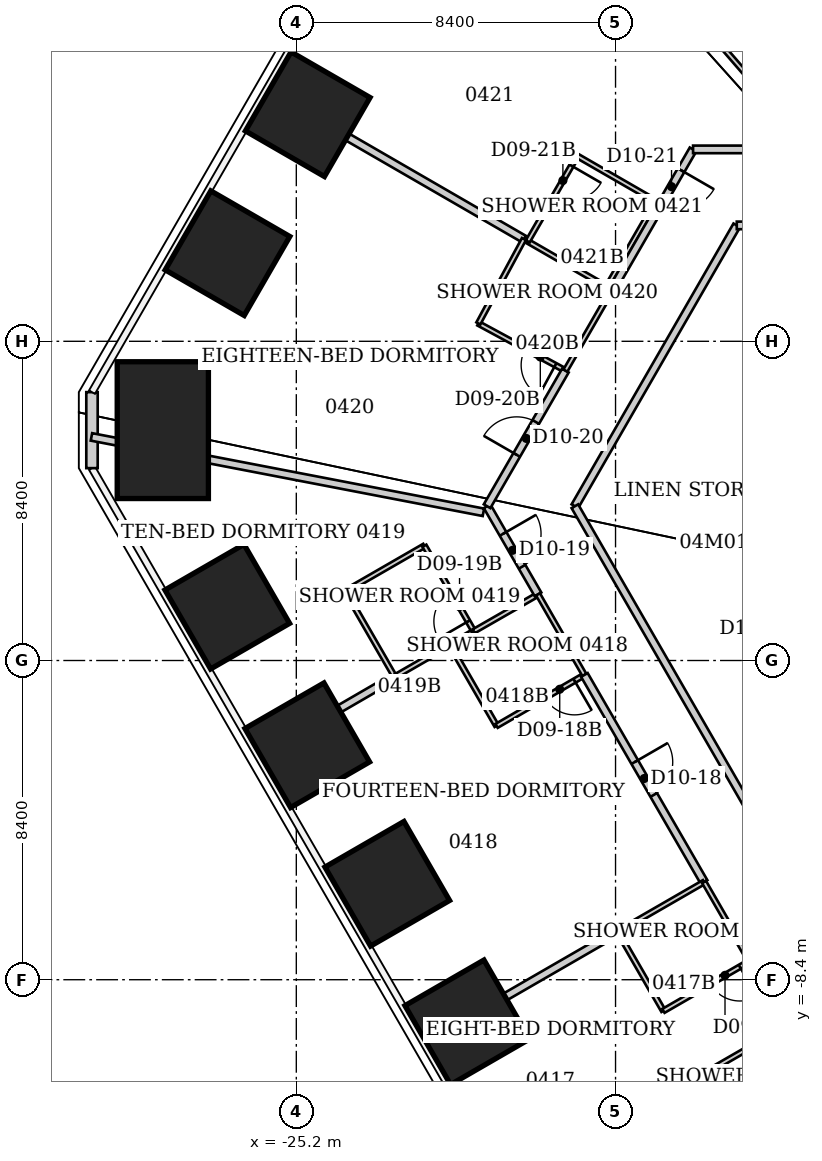
"""IFC4 building model, lengths in metres.
Left out: names, types, materials, properties, quantities, classifications, styles, units other than length and angle.
Written with IfcOpenShell. Run it as: python <this file> out.ifc"""

import sys

from ifc_helpers import new_model, si_unit, direction, frame, frame_2d, origin, origin_2d, place, context, subcontext, project, spatial, rectangle, extrude, element, fill, save


model = new_model("IFC4")
c1 = context("Model", 3, precision=1e-05, world=origin(), true_north=direction((0.0, 1.0)))
c2 = subcontext(c1, "Body", "Model", "MODEL_VIEW")
j1 = project(units=[si_unit("LENGTHUNIT", "METRE"), si_unit("PLANEANGLEUNIT", "RADIAN")], contexts=[c1])
p1 = place(None, origin())
s1 = spatial("IfcSite", under=j1, at=p1, CompositionType="ELEMENT")
p2 = place(p1, origin())
s2 = spatial("IfcBuilding", under=s1, at=p2, CompositionType="ELEMENT")
p3 = place(p2, frame((0.0, 0.0, 23.0)))
s3 = spatial("IfcBuildingStorey", under=s2, at=p3, CompositionType="ELEMENT", Elevation=23.0)
for number, where, z_axis, x_axis in (
    (1, (-20.701, -9.521, 0.0), (0.0, 0.0, 1.0), (-0.866, -0.5, 0.0)),
    (2, (-22.806, -5.875, 0.0), (0.0, 0.0, 1.0), (-0.866, -0.5, 0.0)),
    (3, (-24.911, -2.23, 0.0), (0.0, 0.0, 1.0), (-0.866, -0.5, 0.0)),
    (4, (-27.016, 1.416, 0.0), (0.0, 0.0, 1.0), (-0.866, -0.5, 0.0)),
):
    element("IfcColumn", number, at=place(p3, frame(where, z_axis=z_axis, x_axis=x_axis)), inside=s3, PredefinedType="COLUMN", context=c2, shape_type="SweptSolid", body=[
        extrude(rectangle(XDim=2.4, YDim=2.4, at=origin_2d()), origin(), (0.0, 0.0, 1.0), 3.8),
    ])
p4 = place(p3, frame((-28.713, 6.062, 0.0), z_axis=(0.0, 0.0, 1.0), x_axis=(-1.0, 0.0, 0.0)))
e5 = element("IfcColumn", 5, at=p4, inside=s3, PredefinedType="COLUMN", context=c2, shape_type="SweptSolid", body=[
    extrude(rectangle(XDim=2.4, YDim=3.6, at=origin_2d()), origin(), (0.0, 0.0, 1.0), 3.8),
])
for number, where, z_axis, x_axis in (
    (6, (-27.01, 10.719, 0.0), (0.0, 0.0, 1.0), (-0.866, 0.5, 0.0)),
    (7, (-24.899, 14.375, 0.0), (0.0, 0.0, 1.0), (-0.866, 0.5, 0.0)),
):
    element("IfcColumn", number, at=place(p3, frame(where, z_axis=z_axis, x_axis=x_axis)), inside=s3, PredefinedType="COLUMN", context=c2, shape_type="SweptSolid", body=[
        extrude(rectangle(XDim=2.4, YDim=2.4, at=origin_2d()), origin(), (0.0, 0.0, 1.0), 3.8),
    ])
p5 = place(p3, frame((-30.576, 5.062, 0.0), z_axis=(0.0, 0.0, 1.0), x_axis=(0.0, 1.0, 0.0)))
e8 = element("IfcWall", 8, at=p5, inside=s3, PredefinedType="SOLIDWALL", context=c2, shape_type="SweptSolid", body=[
    extrude(rectangle(XDim=2.0, YDim=0.3, at=frame_2d((1.0, 0.0))), origin(), (0.0, 0.0, 1.0), 3.64),
])
p6 = place(p3, frame((-30.591, 5.884, 0.0), z_axis=(0.0, 0.0, 1.0), x_axis=(0.981987542287, -0.188945671541, 0.0)))
e9 = element("IfcWall", 9, at=p6, inside=s3, PredefinedType="PARTITIONING", context=c2, shape_type="SweptSolid", body=[
    extrude(rectangle(XDim=10.504, YDim=0.2, at=frame_2d((5.252, 0.0))), origin(), (0.0, 0.0, 1.0), 3.64),
])
p7 = place(p3, frame((-26.096, -2.45, 0.0), z_axis=(0.0, 0.0, 1.0), x_axis=(0.864983223647, 0.501800780001, 0.0)))
e10 = element("IfcWall", 10, at=p7, inside=s3, PredefinedType="PARTITIONING", context=c2, shape_type="SweptSolid", body=[
    extrude(rectangle(XDim=4.065, YDim=0.2, at=frame_2d((2.032, 0.0))), origin(), (0.0, 0.0, 1.0), 3.64),
])
p8 = place(p3, frame((-25.886, 14.95, 0.0), z_axis=(0.0, 0.0, 1.0), x_axis=(0.865726686167, -0.50051703753, 0.0)))
e11 = element("IfcWall", 11, at=p8, inside=s3, PredefinedType="PARTITIONING", context=c2, shape_type="SweptSolid", body=[
    extrude(rectangle(XDim=7.712, YDim=0.2, at=frame_2d((3.856, 0.0))), origin(), (0.0, 0.0, 1.0), 2.86),
])
p9 = place(p3, frame((-23.91, 1.82, 0.0), z_axis=(0.0, 0.0, 1.0), x_axis=(0.50026500294, -0.865872350196, 0.0)))
e12 = element("IfcWall", 12, at=p9, inside=s3, PredefinedType="PARTITIONING", context=c2, shape_type="SweptSolid", body=[
    extrude(rectangle(XDim=2.583, YDim=0.12, at=frame_2d((1.292, 0.0))), origin(), (0.0, 0.0, 1.0), 3.64),
])
p10 = place(p3, frame((-22.58, -0.41, 0.0), z_axis=(0.0, 0.0, 1.0), x_axis=(0.866054188497, 0.499950140102, 0.0)))
e13 = element("IfcWall", 13, at=p10, inside=s3, PredefinedType="PARTITIONING", context=c2, shape_type="SweptSolid", body=[
    extrude(rectangle(XDim=1.64, YDim=0.12, at=frame_2d((0.82, 0.0))), origin(), (0.0, 0.0, 1.0), 3.64),
])
p11 = place(p3, frame((-21.83, 3.02, 0.0), z_axis=(0.0, 0.0, 1.0), x_axis=(-0.866177122335, -0.499737123639, 0.0)))
e14 = element("IfcWall", 14, at=p11, inside=s3, PredefinedType="PARTITIONING", context=c2, shape_type="SweptSolid", body=[
    extrude(rectangle(XDim=2.401, YDim=0.12, at=frame_2d((1.201, 0.0))), origin(), (0.0, 0.0, 1.0), 3.64),
])
p12 = place(p3, frame((-21.726, -10.02, 0.0), z_axis=(0.0, 0.0, 1.0), x_axis=(0.865919350456, 0.50018364478, 0.0)))
e15 = element("IfcWall", 15, at=p12, inside=s3, PredefinedType="PARTITIONING", context=c2, shape_type="SweptSolid", body=[
    extrude(rectangle(XDim=5.758, YDim=0.2, at=frame_2d((2.879, 0.0))), origin(), (0.0, 0.0, 1.0), 3.023),
])
p13 = place(p3, frame((-21.16, 0.41, 0.0), z_axis=(0.0, 0.0, 1.0), x_axis=(0.868139588385, 0.496320113515, 0.0)))
e16 = element("IfcWall", 16, at=p13, inside=s3, PredefinedType="PARTITIONING", context=c2, shape_type="SweptSolid", body=[
    extrude(rectangle(XDim=0.726, YDim=0.12, at=frame_2d((0.363, 0.0))), origin(), (0.0, 0.0, 1.0), 3.64),
])
p14 = place(p3, frame((-21.16, 0.41, 0.0), z_axis=(0.0, 0.0, 1.0), x_axis=(0.500089055364, -0.86597398154, 0.0)))
e17 = element("IfcWall", 17, at=p14, inside=s3, PredefinedType="PARTITIONING", context=c2, shape_type="SweptSolid", body=[
    extrude(rectangle(XDim=2.459, YDim=0.12, at=frame_2d((1.23, 0.0))), origin(), (0.0, 0.0, 1.0), 3.64),
])
p15 = place(p3, frame((-20.53, 0.77, 0.0), z_axis=(0.0, 0.0, 1.0), x_axis=(-0.500291685314, 0.865856933682, 0.0)))
e18 = element("IfcWall", 18, at=p15, inside=s3, PredefinedType="PARTITIONING", context=c2, shape_type="SweptSolid", body=[
    extrude(rectangle(XDim=2.599, YDim=0.12, at=frame_2d((1.299, 0.0))), origin(), (0.0, 0.0, 1.0), 3.64),
])
p16 = place(p15, frame((0.3, 0.0, 0.0)))
e19 = element("IfcOpeningElement", 19, at=p16, cuts=e18, PredefinedType="OPENING", context=c2, shape_type="SweptSolid", body=[
    extrude(rectangle(XDim=0.9, YDim=2.03, at=frame_2d((0.45, 1.015))), frame((0.0, 0.06, 0.0), z_axis=(0.0, -1.0, 0.0), x_axis=(1.0, 0.0, 0.0)), (0.0, 0.0, 1.0), 0.12),
])
p17 = place(p3, frame((-20.53, 0.77, 0.0), z_axis=(0.0, 0.0, 1.0), x_axis=(0.867293167797, 0.497797711016, 0.0)))
e20 = element("IfcWall", 20, at=p17, inside=s3, PredefinedType="PARTITIONING", context=c2, shape_type="SweptSolid", body=[
    extrude(rectangle(XDim=1.948, YDim=0.12, at=frame_2d((0.974, 0.0))), origin(), (0.0, 0.0, 1.0), 3.64),
])
p18 = place(p3, frame((-20.41, 8.87, 0.0), z_axis=(0.0, 0.0, 1.0), x_axis=(0.879324680711, -0.476222748189, 0.0)))
e21 = element("IfcWall", 21, at=p18, inside=s3, PredefinedType="PARTITIONING", context=c2, shape_type="SweptSolid", body=[
    extrude(rectangle(XDim=2.604, YDim=0.12, at=frame_2d((1.302, 0.0))), origin(), (0.0, 0.0, 1.0), 3.64),
])
p19 = place(p18, frame((1.404, 0.0, 0.0)))
e22 = element("IfcOpeningElement", 22, at=p19, cuts=e21, PredefinedType="OPENING", context=c2, shape_type="SweptSolid", body=[
    extrude(rectangle(XDim=0.9, YDim=2.03, at=frame_2d((0.45, 1.015))), frame((0.0, 0.06, 0.0), z_axis=(0.0, -1.0, 0.0), x_axis=(1.0, 0.0, 0.0)), (0.0, 0.0, 1.0), 0.12),
])
p20 = place(p3, frame((-20.18, 4.06, 0.0), z_axis=(0.0, 0.0, 1.0), x_axis=(0.500098439427, -0.865968562295, 0.0)))
e23 = element("IfcWall", 23, at=p20, inside=s3, PredefinedType="PARTITIONING", context=c2, shape_type="SweptSolid", body=[
    extrude(rectangle(XDim=2.679, YDim=0.2, at=frame_2d((1.34, 0.0))), origin(), (0.0, 0.0, 1.0), 3.64),
])
p21 = place(p20, frame((0.84, 0.0, 0.0)))
e24 = element("IfcOpeningElement", 24, at=p21, cuts=e23, PredefinedType="OPENING", context=c2, shape_type="SweptSolid", body=[
    extrude(rectangle(XDim=1.0, YDim=2.13, at=frame_2d((0.5, 1.065))), frame((0.0, 0.1, 0.0), z_axis=(0.0, -1.0, 0.0), x_axis=(1.0, 0.0, 0.0)), (0.0, 0.0, 1.0), 0.2),
])
p22 = place(p3, frame((-20.18, 4.06, 0.0), z_axis=(0.0, 0.0, 1.0), x_axis=(0.499891670567, 0.866087938779, 0.0)))
e25 = element("IfcWall", 25, at=p22, inside=s3, PredefinedType="PARTITIONING", context=c2, shape_type="SweptSolid", body=[
    extrude(rectangle(XDim=4.122, YDim=0.2, at=frame_2d((2.061, 0.0))), origin(), (0.0, 0.0, 1.0), 3.64),
])
p23 = place(p22, frame((1.561, 0.0, 0.0)))
e26 = element("IfcOpeningElement", 26, at=p23, cuts=e25, PredefinedType="OPENING", context=c2, shape_type="SweptSolid", body=[
    extrude(rectangle(XDim=1.0, YDim=2.13, at=frame_2d((0.5, 1.065))), frame((0.0, 0.1, 0.0), z_axis=(0.0, -1.0, 0.0), x_axis=(1.0, 0.0, 0.0)), (0.0, 0.0, 1.0), 0.2),
])
p24 = place(p3, frame((-19.93, -1.72, 0.0), z_axis=(0.0, 0.0, 1.0), x_axis=(0.865006586495, 0.501760505939, 0.0)))
e27 = element("IfcWall", 27, at=p24, inside=s3, PredefinedType="PARTITIONING", context=c2, shape_type="SweptSolid", body=[
    extrude(rectangle(XDim=2.67, YDim=0.12, at=frame_2d((1.335, 0.0))), origin(), (0.0, 0.0, 1.0), 2.878),
])
p25 = place(p24, frame((1.47, 0.0, 0.0)))
e28 = element("IfcOpeningElement", 28, at=p25, cuts=e27, PredefinedType="OPENING", context=c2, shape_type="SweptSolid", body=[
    extrude(rectangle(XDim=0.9, YDim=2.03, at=frame_2d((0.45, 1.015))), frame((0.0, 0.06, 0.0), z_axis=(0.0, -1.0, 0.0), x_axis=(1.0, 0.0, 0.0)), (0.0, 0.0, 1.0), 0.12),
])
p26 = place(p3, frame((-19.546, -13.81, 0.0), z_axis=(0.0, 0.0, 1.0), x_axis=(0.865702137343, 0.500559496364, 0.0)))
e29 = element("IfcWall", 29, at=p26, inside=s3, PredefinedType="PARTITIONING", context=c2, shape_type="SweptSolid", body=[
    extrude(rectangle(XDim=5.713, YDim=0.2, at=frame_2d((2.857, 0.0))), origin(), (0.0, 0.0, 1.0), 3.038),
])
p27 = place(p3, frame((-19.21, 11.09, 0.0), z_axis=(0.0, 0.0, 1.0), x_axis=(-0.475466449919, -0.879733854641, 0.0)))
e30 = element("IfcWall", 30, at=p27, inside=s3, PredefinedType="PARTITIONING", context=c2, shape_type="SweptSolid", body=[
    extrude(rectangle(XDim=2.524, YDim=0.12, at=frame_2d((1.262, 0.0))), origin(), (0.0, 0.0, 1.0), 3.64),
])
p28 = place(p3, frame((-19.11, 11.03, 0.0), z_axis=(0.0, 0.0, 1.0), x_axis=(0.866202511239, -0.499693115345, 0.0)))
e31 = element("IfcWall", 31, at=p28, inside=s3, PredefinedType="PARTITIONING", context=c2, shape_type="SweptSolid", body=[
    extrude(rectangle(XDim=2.401, YDim=0.12, at=frame_2d((1.201, 0.0))), origin(), (0.0, 0.0, 1.0), 2.86),
])
p29 = place(p3, frame((-18.84, 1.74, 0.0), z_axis=(0.0, 0.0, 1.0), x_axis=(0.498791783817, -0.866721844883, 0.0)))
e32 = element("IfcWall", 32, at=p29, inside=s3, PredefinedType="PARTITIONING", context=c2, shape_type="SweptSolid", body=[
    extrude(rectangle(XDim=2.446, YDim=0.12, at=frame_2d((1.223, 0.0))), origin(), (0.0, 0.0, 1.0), 3.64),
])
p30 = place(p3, frame((-18.12, 7.63, 0.0), z_axis=(0.0, 0.0, 1.0), x_axis=(0.499957770222, 0.866049783786, 0.0)))
e33 = element("IfcWall", 33, at=p30, inside=s3, PredefinedType="PARTITIONING", context=c2, shape_type="SweptSolid", body=[
    extrude(rectangle(XDim=2.455, YDim=0.12, at=frame_2d((1.228, 0.0))), origin(), (0.0, 0.0, 1.0), 3.64),
])
p31 = place(p3, frame((-17.87, 4.06, 0.0), z_axis=(0.0, 0.0, 1.0), x_axis=(0.499424260127, 0.866357552282, 0.0)))
e34 = element("IfcWall", 34, at=p31, inside=s3, PredefinedType="PARTITIONING", context=c2, shape_type="SweptSolid", body=[
    extrude(rectangle(XDim=8.53, YDim=0.2, at=frame_2d((4.265, 0.0))), origin(), (0.0, 0.0, 1.0), 3.64),
])
p32 = place(p3, frame((-17.81, 13.28, 0.0), z_axis=(0.0, 0.0, 1.0), x_axis=(-0.500291685314, -0.865856933682, 0.0)))
e35 = element("IfcWall", 35, at=p32, inside=s3, PredefinedType="PARTITIONING", context=c2, shape_type="SweptSolid", body=[
    extrude(rectangle(XDim=2.599, YDim=0.12, at=frame_2d((1.299, 0.0))), origin(), (0.0, 0.0, 1.0), 3.64),
])
p33 = place(p32, frame((0.3, 0.0, 0.0)))
e36 = element("IfcOpeningElement", 36, at=p33, cuts=e35, PredefinedType="OPENING", context=c2, shape_type="SweptSolid", body=[
    extrude(rectangle(XDim=0.9, YDim=2.03, at=frame_2d((0.45, 1.015))), frame((0.0, 0.06, 0.0), z_axis=(0.0, -1.0, 0.0), x_axis=(1.0, 0.0, 0.0)), (0.0, 0.0, 1.0), 0.12),
])
p34 = place(p3, frame((-17.62, -0.38, 0.0), z_axis=(0.0, 0.0, 1.0), x_axis=(0.500413927211, -0.865786290867, 0.0)))
e37 = element("IfcWall", 37, at=p34, inside=s3, PredefinedType="PARTITIONING", context=c2, shape_type="SweptSolid", body=[
    extrude(rectangle(XDim=6.295, YDim=0.2, at=frame_2d((3.147, 0.0))), origin(), (0.0, 0.0, 1.0), 3.64),
])
p35 = place(p34, frame((2.647, 0.0, 0.0)))
e38 = element("IfcOpeningElement", 38, at=p35, cuts=e37, PredefinedType="OPENING", context=c2, shape_type="SweptSolid", body=[
    extrude(rectangle(XDim=1.0, YDim=2.13, at=frame_2d((0.5, 1.065))), frame((0.0, 0.1, 0.0), z_axis=(0.0, -1.0, 0.0), x_axis=(1.0, 0.0, 0.0)), (0.0, 0.0, 1.0), 0.2),
])
p36 = place(p3, frame((-17.03, 9.83, 0.0), z_axis=(0.0, 0.0, 1.0), x_axis=(0.880098986228, -0.47479024257, 0.0)))
e39 = element("IfcWall", 39, at=p36, inside=s3, PredefinedType="PARTITIONING", context=c2, shape_type="SweptSolid", body=[
    extrude(rectangle(XDim=0.147, YDim=0.12, at=frame_2d((0.074, 0.0))), origin(), (0.0, 0.0, 1.0), 3.64),
])
p37 = place(p3, frame((-17.03, 9.83, 0.0), z_axis=(0.0, 0.0, 1.0), x_axis=(0.500291685314, 0.865856933682, 0.0)))
e40 = element("IfcWall", 40, at=p37, inside=s3, PredefinedType="PARTITIONING", context=c2, shape_type="SweptSolid", body=[
    extrude(rectangle(XDim=2.599, YDim=0.12, at=frame_2d((1.299, 0.0))), origin(), (0.0, 0.0, 1.0), 3.64),
])
p38 = place(p3, frame((-16.892, 9.756, 0.0), z_axis=(0.0, 0.0, 1.0), x_axis=(0.499894213467, 0.866086471054, 0.0)))
e41 = element("IfcWall", 41, at=p38, inside=s3, PredefinedType="PARTITIONING", context=c2, shape_type="SweptSolid", body=[
    extrude(rectangle(XDim=4.266, YDim=0.2, at=frame_2d((2.133, 0.0))), origin(), (0.0, 0.0, 1.0), 3.64),
])
p39 = place(p38, frame((2.633, 0.0, 0.0)))
e42 = element("IfcOpeningElement", 42, at=p39, cuts=e41, PredefinedType="OPENING", context=c2, shape_type="SweptSolid", body=[
    extrude(rectangle(XDim=1.0, YDim=2.13, at=frame_2d((0.5, 1.065))), frame((0.0, 0.1, 0.0), z_axis=(0.0, -1.0, 0.0), x_axis=(1.0, 0.0, 0.0)), (0.0, 0.0, 1.0), 0.2),
])
p40 = place(p3, frame((-16.74, -7.14, 0.0), z_axis=(0.0, 0.0, 1.0), x_axis=(0.499693115345, -0.866202511239, 0.0)))
e43 = element("IfcWall", 43, at=p40, inside=s3, PredefinedType="PARTITIONING", context=c2, shape_type="SweptSolid", body=[
    extrude(rectangle(XDim=2.401, YDim=0.12, at=frame_2d((1.201, 0.0))), origin(), (0.0, 0.0, 1.0), 3.64),
])
p41 = place(p3, frame((-16.74, -7.14, 0.0), z_axis=(0.0, 0.0, 1.0), x_axis=(0.866154567199, 0.49977621564, 0.0)))
e44 = element("IfcWall", 44, at=p41, inside=s3, PredefinedType="PARTITIONING", context=c2, shape_type="SweptSolid", body=[
    extrude(rectangle(XDim=2.621, YDim=0.12, at=frame_2d((1.311, 0.0))), origin(), (0.0, 0.0, 1.0), 3.023),
])
p42 = place(p3, frame((-15.73, 12.08, 0.0), z_axis=(0.0, 0.0, 1.0), x_axis=(-0.866202511239, 0.499693115345, 0.0)))
e45 = element("IfcWall", 45, at=p42, inside=s3, PredefinedType="PARTITIONING", context=c2, shape_type="SweptSolid", body=[
    extrude(rectangle(XDim=2.401, YDim=0.12, at=frame_2d((1.201, 0.0))), origin(), (0.0, 0.0, 1.0), 3.64),
])
p43 = place(p3, frame((-15.54, -9.22, 0.0), z_axis=(0.0, 0.0, 1.0), x_axis=(0.866114241029, 0.499846097802, 0.0)))
e46 = element("IfcWall", 46, at=p43, inside=s3, PredefinedType="PARTITIONING", context=c2, shape_type="SweptSolid", body=[
    extrude(rectangle(XDim=2.621, YDim=0.12, at=frame_2d((1.311, 0.0))), origin(), (0.0, 0.0, 1.0), 3.64),
])
p44 = place(p43, frame((1.421, 0.0, 0.0)))
e47 = element("IfcOpeningElement", 47, at=p44, cuts=e46, PredefinedType="OPENING", context=c2, shape_type="SweptSolid", body=[
    extrude(rectangle(XDim=0.9, YDim=2.03, at=frame_2d((0.45, 1.015))), frame((0.0, 0.06, 0.0), z_axis=(0.0, -1.0, 0.0), x_axis=(1.0, 0.0, 0.0)), (0.0, 0.0, 1.0), 0.12),
])
p45 = place(p3, frame((-14.6, -10.95, 0.0), z_axis=(0.0, 0.0, 1.0), x_axis=(0.501888006485, -0.864932615264, 0.0)))
e48 = element("IfcWall", 48, at=p45, inside=s3, PredefinedType="PARTITIONING", context=c2, shape_type="SweptSolid", body=[
    extrude(rectangle(XDim=2.451, YDim=0.12, at=frame_2d((1.226, 0.0))), origin(), (0.0, 0.0, 1.0), 3.64),
])
p46 = place(p3, frame((-14.6, -10.95, 0.0), z_axis=(0.0, 0.0, 1.0), x_axis=(0.866654860089, 0.498908161372, 0.0)))
e49 = element("IfcWall", 49, at=p46, inside=s3, PredefinedType="PARTITIONING", context=c2, shape_type="SweptSolid", body=[
    extrude(rectangle(XDim=2.666, YDim=0.12, at=frame_2d((1.333, 0.0))), origin(), (0.0, 0.0, 1.0), 3.038),
])
p47 = place(p3, frame((-14.47, -5.83, 0.0), z_axis=(0.0, 0.0, 1.0), x_axis=(0.499737123639, -0.866177122335, 0.0)))
e50 = element("IfcWall", 50, at=p47, inside=s3, PredefinedType="PARTITIONING", context=c2, shape_type="SweptSolid", body=[
    extrude(rectangle(XDim=2.401, YDim=0.12, at=frame_2d((1.201, 0.0))), origin(), (0.0, 0.0, 1.0), 3.64),
])
p48 = place(p3, frame((-14.101, 16.279, 0.0), z_axis=(0.0, 0.0, 1.0), x_axis=(0.654868469202, -0.755742871647, 0.0)))
e51 = element("IfcWall", 51, at=p48, inside=s3, PredefinedType="PARTITIONING", context=c2, shape_type="SweptSolid", body=[
    extrude(rectangle(XDim=2.396, YDim=0.12, at=frame_2d((1.198, 0.0))), origin(), (0.0, 0.0, 1.0), 3.64),
])
p49 = place(p3, frame((-13.61, 11.45, 0.0), z_axis=(0.0, 0.0, 1.0), x_axis=(1.0, 0.0, 0.0)))
e52 = element("IfcWall", 52, at=p49, inside=s3, PredefinedType="PARTITIONING", context=c2, shape_type="SweptSolid", body=[
    extrude(rectangle(XDim=4.67, YDim=0.2, at=frame_2d((2.335, 0.0))), origin(), (0.0, 0.0, 1.0), 3.64),
])
p50 = place(p3, frame((-11.65, 13.45, 0.0), z_axis=(0.0, 0.0, 1.0), x_axis=(-1.0, 0.0, 0.0)))
e53 = element("IfcWall", 53, at=p50, inside=s3, PredefinedType="PARTITIONING", context=c2, shape_type="SweptSolid", body=[
    extrude(rectangle(XDim=3.11, YDim=0.2, at=frame_2d((1.555, 0.0))), origin(), (0.0, 0.0, 1.0), 3.64),
])
p51 = place(p3, frame((-11.147, -7.591, 0.0), z_axis=(0.0, 0.0, 1.0), x_axis=(-0.499756496688, 0.86616594485, 0.0)))
e54 = element("IfcWall", 54, at=p51, inside=s3, PredefinedType="PARTITIONING", context=c2, shape_type="SweptSolid", body=[
    extrude(rectangle(XDim=13.451, YDim=0.2, at=frame_2d((6.726, 0.0))), origin(), (0.0, 0.0, 1.0), 3.64),
])
p52 = place(p44, origin())
e55 = element("IfcDoor", 55, at=p52, inside=s3, OperationType="SINGLE_SWING_RIGHT", PredefinedType="DOOR", context=c2, shape_type="SweptSolid", body=[
    extrude(rectangle(XDim=0.9, YDim=2.03, at=frame_2d((0.45, 1.015))), frame((0.0, 0.025, 0.0), z_axis=(0.0, -1.0, 0.0), x_axis=(1.0, 0.0, 0.0)), (0.0, 0.0, 1.0), 0.05),
])
fill(e47, e55)
p53 = place(p35, origin())
e56 = element("IfcDoor", 56, at=p53, inside=s3, OperationType="SINGLE_SWING_LEFT", PredefinedType="DOOR", context=c2, shape_type="SweptSolid", body=[
    extrude(rectangle(XDim=1.0, YDim=2.13, at=frame_2d((0.5, 1.065))), frame((0.0, 0.025, 0.0), z_axis=(0.0, -1.0, 0.0), x_axis=(1.0, 0.0, 0.0)), (0.0, 0.0, 1.0), 0.05),
])
fill(e38, e56)
p54 = place(p25, origin())
e57 = element("IfcDoor", 57, at=p54, inside=s3, OperationType="SINGLE_SWING_RIGHT", PredefinedType="DOOR", context=c2, shape_type="SweptSolid", body=[
    extrude(rectangle(XDim=0.9, YDim=2.03, at=frame_2d((0.45, 1.015))), frame((0.0, 0.025, 0.0), z_axis=(0.0, -1.0, 0.0), x_axis=(1.0, 0.0, 0.0)), (0.0, 0.0, 1.0), 0.05),
])
fill(e28, e57)
p55 = place(p21, origin())
e58 = element("IfcDoor", 58, at=p55, inside=s3, OperationType="SINGLE_SWING_LEFT", PredefinedType="DOOR", context=c2, shape_type="SweptSolid", body=[
    extrude(rectangle(XDim=1.0, YDim=2.13, at=frame_2d((0.5, 1.065))), frame((0.0, 0.025, 0.0), z_axis=(0.0, -1.0, 0.0), x_axis=(1.0, 0.0, 0.0)), (0.0, 0.0, 1.0), 0.05),
])
fill(e24, e58)
p56 = place(p16, origin())
e59 = element("IfcDoor", 59, at=p56, inside=s3, OperationType="SINGLE_SWING_LEFT", PredefinedType="DOOR", context=c2, shape_type="SweptSolid", body=[
    extrude(rectangle(XDim=0.9, YDim=2.03, at=frame_2d((0.45, 1.015))), frame((0.0, 0.025, 0.0), z_axis=(0.0, -1.0, 0.0), x_axis=(1.0, 0.0, 0.0)), (0.0, 0.0, 1.0), 0.05),
])
fill(e19, e59)
p57 = place(p23, origin())
e60 = element("IfcDoor", 60, at=p57, inside=s3, OperationType="SINGLE_SWING_LEFT", PredefinedType="DOOR", context=c2, shape_type="SweptSolid", body=[
    extrude(rectangle(XDim=1.0, YDim=2.13, at=frame_2d((0.5, 1.065))), frame((0.0, 0.025, 0.0), z_axis=(0.0, -1.0, 0.0), x_axis=(1.0, 0.0, 0.0)), (0.0, 0.0, 1.0), 0.05),
])
fill(e26, e60)
p58 = place(p19, origin())
e61 = element("IfcDoor", 61, at=p58, inside=s3, OperationType="SINGLE_SWING_RIGHT", PredefinedType="DOOR", context=c2, shape_type="SweptSolid", body=[
    extrude(rectangle(XDim=0.9, YDim=2.03, at=frame_2d((0.45, 1.015))), frame((0.0, 0.025, 0.0), z_axis=(0.0, -1.0, 0.0), x_axis=(1.0, 0.0, 0.0)), (0.0, 0.0, 1.0), 0.05),
])
fill(e22, e61)
p59 = place(p39, origin())
e62 = element("IfcDoor", 62, at=p59, inside=s3, OperationType="SINGLE_SWING_RIGHT", PredefinedType="DOOR", context=c2, shape_type="SweptSolid", body=[
    extrude(rectangle(XDim=1.0, YDim=2.13, at=frame_2d((0.5, 1.065))), frame((0.0, 0.025, 0.0), z_axis=(0.0, -1.0, 0.0), x_axis=(1.0, 0.0, 0.0)), (0.0, 0.0, 1.0), 0.05),
])
fill(e42, e62)
p60 = place(p33, origin())
e63 = element("IfcDoor", 63, at=p60, inside=s3, OperationType="SINGLE_SWING_LEFT", PredefinedType="DOOR", context=c2, shape_type="SweptSolid", body=[
    extrude(rectangle(XDim=0.9, YDim=2.03, at=frame_2d((0.45, 1.015))), frame((0.0, 0.025, 0.0), z_axis=(0.0, -1.0, 0.0), x_axis=(1.0, 0.0, 0.0)), (0.0, 0.0, 1.0), 0.05),
])
fill(e36, e63)
save(model, sys.argv[1])
